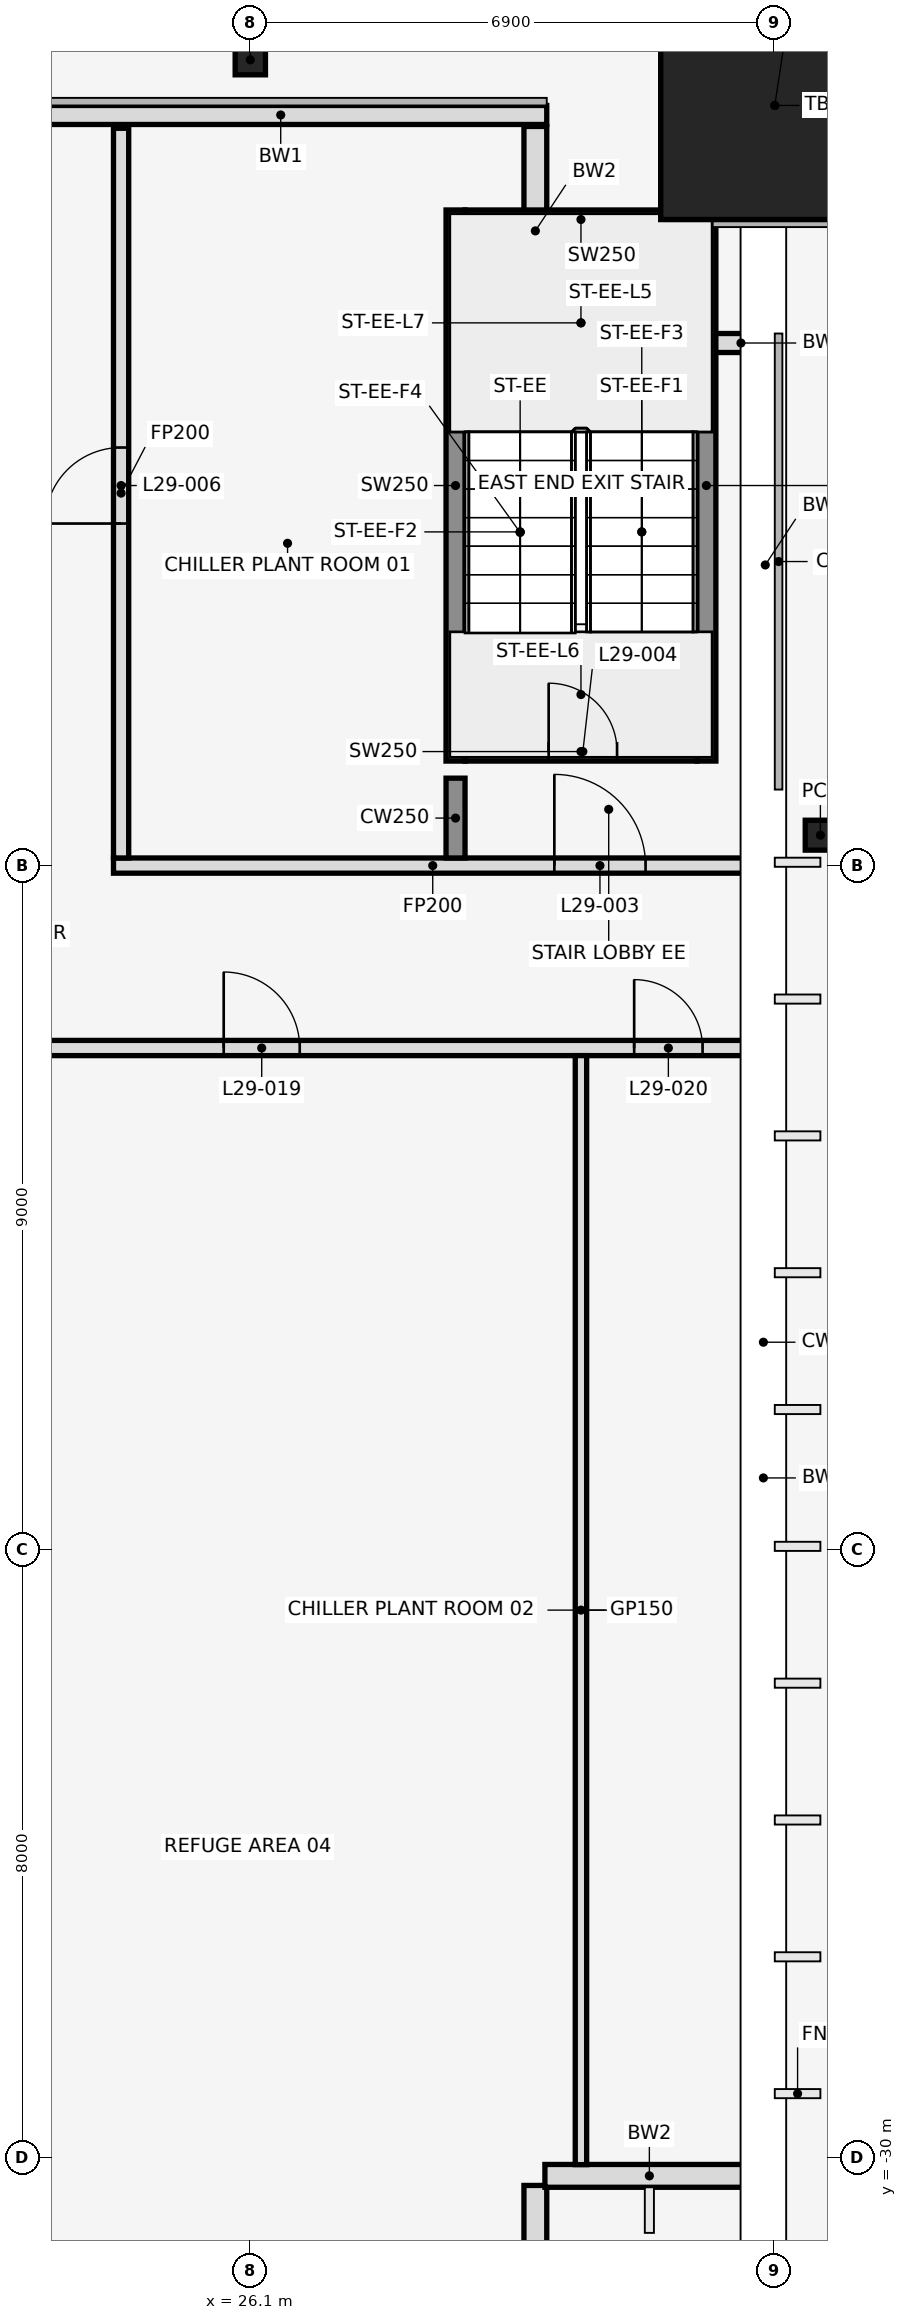
"""IFC4 building model, lengths in metres.
Left out: names, types, materials, properties, quantities, classifications, styles, units other than length and angle.
Written with IfcOpenShell. Run it as: python <this file> out.ifc"""

import sys

from ifc_helpers import new_model, si_unit, direction, frame, frame_2d, origin, origin_2d, place, context, subcontext, project, spatial, rectangle, hollow_rectangle, i_section, extrude, element, fill, save


model = new_model("IFC4")
c1 = context("Model", 3, precision=1e-05, world=origin(), true_north=direction((0.0, 1.0)))
c2 = subcontext(c1, "Body", "Model", "MODEL_VIEW")
j1 = project(units=[si_unit("LENGTHUNIT", "METRE"), si_unit("PLANEANGLEUNIT", "RADIAN")], contexts=[c1])
p1 = place(None, origin())
s1 = spatial("IfcSite", under=j1, at=p1, CompositionType="ELEMENT")
p2 = place(p1, origin())
s2 = spatial("IfcBuilding", under=s1, at=p2, CompositionType="ELEMENT")
p3 = place(p2, frame((0.0, 0.0, 135.0)))
s3 = spatial("IfcBuildingStorey", under=s2, at=p3, CompositionType="ELEMENT", Elevation=135.0)
p4 = place(p3, frame((26.1, -2.4, 0.0), z_axis=(0.0, 0.0, 1.0), x_axis=(1.0, 0.0, 0.0)))
e1 = element("IfcColumn", 1, at=p4, inside=s3, PredefinedType="COLUMN", context=c2, shape_type="SweptSolid", body=[
    extrude(i_section(OverallWidth=0.399, OverallDepth=0.394, WebThickness=0.023, FlangeThickness=0.037, at=origin_2d()), origin(), (0.0, 0.0, 1.0), 5.4),
])
p5 = place(p3, frame((33.0, -3.0, 0.0), z_axis=(0.0, 0.0, 1.0), x_axis=(1.0, 0.0, 0.0)))
e2 = element("IfcColumn", 2, at=p5, inside=s3, PredefinedType="COLUMN", context=c2, shape_type="SweptSolid", body=[
    extrude(hollow_rectangle(XDim=3.0, YDim=3.0, WallThickness=0.09, at=origin_2d()), origin(), (0.0, 0.0, 1.0), 4.98),
])
p6 = place(p3, frame((33.6, -12.6, 0.0), z_axis=(0.0, 0.0, 1.0), x_axis=(1.0, 0.0, 0.0)))
e3 = element("IfcColumn", 3, at=p6, inside=s3, PredefinedType="COLUMN", context=c2, shape_type="SweptSolid", body=[
    extrude(i_section(OverallWidth=0.399, OverallDepth=0.394, WebThickness=0.023, FlangeThickness=0.037, at=origin_2d()), origin(), (0.0, 0.0, 1.0), 5.4),
])
p7 = place(p3, frame((33.0, -3.0, 4.98), z_axis=(0.0, 0.0, 1.0), x_axis=(1.0, 0.0, 0.0)))
e4 = element("IfcColumn", 4, at=p7, inside=s3, PredefinedType="COLUMN", context=c2, shape_type="SweptSolid", body=[
    extrude(rectangle(XDim=3.0, YDim=3.0, at=origin_2d()), origin(), (0.0, 0.0, 1.0), 0.42),
])
p8 = place(p3, frame((32.85, -30.112, 0.0), z_axis=(0.0, 0.0, 1.0), x_axis=(0.0, 1.0, 0.0)))
e5 = element("IfcWall", 5, at=p8, inside=s3, PredefinedType="STANDARD", context=c2, shape_type="SweptSolid", body=[
    extrude(rectangle(XDim=18.112, YDim=0.3, at=frame_2d((9.056, 0.0))), origin(), (0.0, 0.0, 1.0), 4.338),
])
p9 = place(p3, frame((29.85, -6.024, 0.0), z_axis=(0.0, 0.0, 1.0), x_axis=(0.0, 1.0, 0.0)))
e6 = element("IfcWall", 6, at=p9, inside=s3, PredefinedType="STANDARD", context=c2, shape_type="SweptSolid", body=[
    extrude(rectangle(XDim=2.748, YDim=0.3, at=frame_2d((1.374, 0.0))), origin(), (0.0, 0.0, 1.0), 5.25),
])
p10 = place(p3, frame((29.85, -33.112, 0.0), z_axis=(0.0, 0.0, 1.0), x_axis=(0.0, 1.0, 0.0)))
e7 = element("IfcWall", 7, at=p10, inside=s3, PredefinedType="STANDARD", context=c2, shape_type="SweptSolid", body=[
    extrude(rectangle(XDim=2.748, YDim=0.3, at=frame_2d((1.374, 0.0))), origin(), (0.0, 0.0, 1.0), 4.28),
])
p11 = place(p3, frame((29.976, -30.238, 0.0), z_axis=(0.0, 0.0, 1.0), x_axis=(1.0, 0.0, 0.0)))
e8 = element("IfcWall", 8, at=p11, inside=s3, PredefinedType="STANDARD", context=c2, shape_type="SweptSolid", body=[
    extrude(rectangle(XDim=2.748, YDim=0.3, at=frame_2d((1.374, 0.0))), origin(), (0.0, 0.0, 1.0), 4.28),
])
p12 = place(p3, frame((32.875, -12.09, 0.0), z_axis=(0.0, 0.0, 1.0), x_axis=(0.0, 1.0, 0.0)))
e9 = element("IfcWall", 9, at=p12, inside=s3, PredefinedType="STANDARD", context=c2, shape_type="SweptSolid", body=[
    extrude(rectangle(XDim=6.09, YDim=0.25, at=frame_2d((3.045, 0.0))), origin(), (0.0, 0.0, 1.0), 5.25),
])
p13 = place(p3, frame((33.0, -6.125, 0.0), z_axis=(0.0, 0.0, 1.0), x_axis=(-1.0, 0.0, 0.0)))
e10 = element("IfcWall", 10, at=p13, inside=s3, PredefinedType="STANDARD", context=c2, shape_type="SweptSolid", body=[
    extrude(rectangle(XDim=0.89, YDim=0.25, at=frame_2d((0.445, 0.0))), origin(), (0.0, 0.0, 1.0), 5.25),
])
p14 = place(p3, frame((30.0, -3.125, 0.0), z_axis=(0.0, 0.0, 1.0), x_axis=(-1.0, 0.0, 0.0)))
e11 = element("IfcWall", 11, at=p14, inside=s3, PredefinedType="STANDARD", context=c2, shape_type="SweptSolid", body=[
    extrude(rectangle(XDim=7.0, YDim=0.25, at=frame_2d((3.5, 0.0))), origin(), (0.0, 0.0, 1.0), 5.25),
])
for number, where, z_axis, x_axis in (
    (12, (28.8, -11.625, 0.0), (0.0, 0.0, 1.0), (0.0, 1.0, 0.0)),
    (13, (32.1, -11.625, 0.0), (0.0, 0.0, 1.0), (0.0, 1.0, 0.0)),
):
    element("IfcWall", number, at=place(p3, frame(where, z_axis=z_axis, x_axis=x_axis)), inside=s3, PredefinedType="SHEAR", context=c2, shape_type="SweptSolid", body=[
        extrude(rectangle(XDim=7.25, YDim=0.25, at=frame_2d((3.625, 0.0))), origin(), (0.0, 0.0, 1.0), 5.4),
    ])
p15 = place(p3, frame((28.925, -11.5, 0.0), z_axis=(0.0, 0.0, 1.0), x_axis=(1.0, 0.0, 0.0)))
e14 = element("IfcWall", 14, at=p15, inside=s3, PredefinedType="SHEAR", context=c2, shape_type="SweptSolid", body=[
    extrude(rectangle(XDim=3.05, YDim=0.25, at=frame_2d((1.525, 0.0))), origin(), (0.0, 0.0, 1.0), 5.4),
])
p16 = place(p15, frame((1.1, 0.0, 0.0)))
e15 = element("IfcOpeningElement", 15, at=p16, cuts=e14, PredefinedType="OPENING", context=c2, shape_type="SweptSolid", body=[
    extrude(rectangle(XDim=0.9, YDim=2.1, at=frame_2d((0.45, 1.05))), frame((0.0, 0.137, 0.0), z_axis=(0.0, -1.0, 0.0), x_axis=(1.0, 0.0, 0.0)), (0.0, 0.0, 1.0), 0.274),
])
p17 = place(p3, frame((28.925, -4.5, 0.0), z_axis=(0.0, 0.0, 1.0), x_axis=(1.0, 0.0, 0.0)))
e16 = element("IfcWall", 16, at=p17, inside=s3, PredefinedType="SHEAR", context=c2, shape_type="SweptSolid", body=[
    extrude(rectangle(XDim=3.05, YDim=0.25, at=frame_2d((1.525, 0.0))), origin(), (0.0, 0.0, 1.0), 5.4),
])
p18 = place(p3, frame((-32.7, -15.4, 0.0), z_axis=(0.0, 0.0, 1.0), x_axis=(1.0, 0.0, 0.0)))
e17 = element("IfcWall", 17, at=p18, inside=s3, PredefinedType="PARTITIONING", context=c2, shape_type="SweptSolid", body=[
    extrude(rectangle(XDim=65.4, YDim=0.2, at=frame_2d((32.7, 0.0))), origin(), (0.0, 0.0, 1.0), 4.24),
])
p19 = place(p18, frame((0.7, 0.0, 0.0)))
e18 = element("IfcOpeningElement", 18, at=p19, cuts=e17, PredefinedType="OPENING", context=c2, shape_type="SweptSolid", body=[
    extrude(rectangle(XDim=0.9, YDim=2.1, at=frame_2d((0.45, 1.05))), frame((0.0, 0.112, 0.0), z_axis=(0.0, -1.0, 0.0), x_axis=(1.0, 0.0, 0.0)), (0.0, 0.0, 1.0), 0.224),
])
p20 = place(p18, frame((5.95, 0.0, 0.0)))
e19 = element("IfcOpeningElement", 19, at=p20, cuts=e17, PredefinedType="OPENING", context=c2, shape_type="SweptSolid", body=[
    extrude(rectangle(XDim=1.0, YDim=2.1, at=frame_2d((0.5, 1.05))), frame((0.0, 0.112, 0.0), z_axis=(0.0, -1.0, 0.0), x_axis=(1.0, 0.0, 0.0)), (0.0, 0.0, 1.0), 0.224),
])
p21 = place(p18, frame((14.85, 0.0, 0.0)))
e20 = element("IfcOpeningElement", 20, at=p21, cuts=e17, PredefinedType="OPENING", context=c2, shape_type="SweptSolid", body=[
    extrude(rectangle(XDim=1.0, YDim=2.1, at=frame_2d((0.5, 1.05))), frame((0.0, 0.112, 0.0), z_axis=(0.0, -1.0, 0.0), x_axis=(1.0, 0.0, 0.0)), (0.0, 0.0, 1.0), 0.224),
])
p22 = place(p18, frame((23.55, 0.0, 0.0)))
e21 = element("IfcOpeningElement", 21, at=p22, cuts=e17, PredefinedType="OPENING", context=c2, shape_type="SweptSolid", body=[
    extrude(rectangle(XDim=1.0, YDim=2.1, at=frame_2d((0.5, 1.05))), frame((0.0, 0.112, 0.0), z_axis=(0.0, -1.0, 0.0), x_axis=(1.0, 0.0, 0.0)), (0.0, 0.0, 1.0), 0.224),
])
p23 = place(p18, frame((34.4, 0.0, 0.0)))
e22 = element("IfcOpeningElement", 22, at=p23, cuts=e17, PredefinedType="OPENING", context=c2, shape_type="SweptSolid", body=[
    extrude(rectangle(XDim=1.0, YDim=2.1, at=frame_2d((0.5, 1.05))), frame((0.0, 0.112, 0.0), z_axis=(0.0, -1.0, 0.0), x_axis=(1.0, 0.0, 0.0)), (0.0, 0.0, 1.0), 0.224),
])
p24 = place(p18, frame((40.95, 0.0, 0.0)))
e23 = element("IfcOpeningElement", 23, at=p24, cuts=e17, PredefinedType="OPENING", context=c2, shape_type="SweptSolid", body=[
    extrude(rectangle(XDim=1.0, YDim=2.1, at=frame_2d((0.5, 1.05))), frame((0.0, 0.112, 0.0), z_axis=(0.0, -1.0, 0.0), x_axis=(1.0, 0.0, 0.0)), (0.0, 0.0, 1.0), 0.224),
])
p25 = place(p18, frame((49.65, 0.0, 0.0)))
e24 = element("IfcOpeningElement", 24, at=p25, cuts=e17, PredefinedType="OPENING", context=c2, shape_type="SweptSolid", body=[
    extrude(rectangle(XDim=0.9, YDim=2.1, at=frame_2d((0.45, 1.05))), frame((0.0, 0.112, 0.0), z_axis=(0.0, -1.0, 0.0), x_axis=(1.0, 0.0, 0.0)), (0.0, 0.0, 1.0), 0.224),
])
p26 = place(p18, frame((58.45, 0.0, 0.0)))
e25 = element("IfcOpeningElement", 25, at=p26, cuts=e17, PredefinedType="OPENING", context=c2, shape_type="SweptSolid", body=[
    extrude(rectangle(XDim=1.0, YDim=2.1, at=frame_2d((0.5, 1.05))), frame((0.0, 0.112, 0.0), z_axis=(0.0, -1.0, 0.0), x_axis=(1.0, 0.0, 0.0)), (0.0, 0.0, 1.0), 0.224),
])
p27 = place(p18, frame((63.85, 0.0, 0.0)))
e26 = element("IfcOpeningElement", 26, at=p27, cuts=e17, PredefinedType="OPENING", context=c2, shape_type="SweptSolid", body=[
    extrude(rectangle(XDim=0.9, YDim=2.1, at=frame_2d((0.45, 1.05))), frame((0.0, 0.112, 0.0), z_axis=(0.0, -1.0, 0.0), x_axis=(1.0, 0.0, 0.0)), (0.0, 0.0, 1.0), 0.224),
])
p28 = place(p3, frame((24.3, -13.0, 0.0), z_axis=(0.0, 0.0, 1.0), x_axis=(1.0, 0.0, 0.0)))
e27 = element("IfcWall", 27, at=p28, inside=s3, PredefinedType="PARTITIONING", context=c2, shape_type="SweptSolid", body=[
    extrude(rectangle(XDim=8.4, YDim=0.2, at=frame_2d((4.2, 0.0))), origin(), (0.0, 0.0, 1.0), 4.24),
])
p29 = place(p28, frame((5.8, 0.0, 0.0)))
e28 = element("IfcOpeningElement", 28, at=p29, cuts=e27, PredefinedType="OPENING", context=c2, shape_type="SweptSolid", body=[
    extrude(rectangle(XDim=1.2, YDim=2.1, at=frame_2d((0.6, 1.05))), frame((0.0, 0.112, 0.0), z_axis=(0.0, -1.0, 0.0), x_axis=(1.0, 0.0, 0.0)), (0.0, 0.0, 1.0), 0.224),
])
p30 = place(p3, frame((24.4, -12.9, 0.0), z_axis=(0.0, 0.0, 1.0), x_axis=(0.0, 1.0, 0.0)))
e29 = element("IfcWall", 29, at=p30, inside=s3, PredefinedType="PARTITIONING", context=c2, shape_type="SweptSolid", body=[
    extrude(rectangle(XDim=9.6, YDim=0.2, at=frame_2d((4.8, 0.0))), origin(), (0.0, 0.0, 1.0), 4.24),
])
p31 = place(p30, frame((4.4, 0.0, 0.0)))
e30 = element("IfcOpeningElement", 30, at=p31, cuts=e29, PredefinedType="OPENING", context=c2, shape_type="SweptSolid", body=[
    extrude(rectangle(XDim=1.0, YDim=2.1, at=frame_2d((0.5, 1.05))), frame((0.0, 0.112, 0.0), z_axis=(0.0, -1.0, 0.0), x_axis=(1.0, 0.0, 0.0)), (0.0, 0.0, 1.0), 0.224),
])
p32 = place(p3, frame((28.8, -12.9, 0.0), z_axis=(0.0, 0.0, 1.0), x_axis=(0.0, 1.0, 0.0)))
e31 = element("IfcWall", 31, at=p32, inside=s3, PredefinedType="SHEAR", context=c2, shape_type="SweptSolid", body=[
    extrude(rectangle(XDim=1.05, YDim=0.25, at=frame_2d((0.525, 0.0))), origin(), (0.0, 0.0, 1.0), 5.4),
])
p33 = place(p3, frame((30.45, -30.09, 0.0), z_axis=(0.0, 0.0, 1.0), x_axis=(0.0, 1.0, 0.0)))
e32 = element("IfcWall", 32, at=p33, inside=s3, PredefinedType="PARTITIONING", context=c2, shape_type="SweptSolid", body=[
    extrude(rectangle(XDim=14.59, YDim=0.15, at=frame_2d((7.295, 0.0))), origin(), (0.0, 0.0, 1.0), 4.24),
])
p34 = place(p29, origin())
e33 = element("IfcDoor", 33, at=p34, inside=s3, OperationType="SINGLE_SWING_RIGHT", PredefinedType="DOOR", context=c2, shape_type="SweptSolid", body=[
    extrude(rectangle(XDim=1.2, YDim=2.1, at=frame_2d((0.6, 1.05))), frame((0.0, 0.025, 0.0), z_axis=(0.0, -1.0, 0.0), x_axis=(1.0, 0.0, 0.0)), (0.0, 0.0, 1.0), 0.05),
])
fill(e28, e33)
p35 = place(p16, origin())
e34 = element("IfcDoor", 34, at=p35, inside=s3, OperationType="SINGLE_SWING_LEFT", PredefinedType="DOOR", context=c2, shape_type="SweptSolid", body=[
    extrude(rectangle(XDim=0.9, YDim=2.1, at=frame_2d((0.45, 1.05))), frame((0.0, 0.025, 0.0), z_axis=(0.0, -1.0, 0.0), x_axis=(1.0, 0.0, 0.0)), (0.0, 0.0, 1.0), 0.05),
])
fill(e15, e34)
p36 = place(p31, frame((1.0, 0.0, 0.0), z_axis=(0.0, 0.0, 1.0), x_axis=(-1.0, 0.0, 0.0)))
e35 = element("IfcDoor", 35, at=p36, inside=s3, OperationType="SINGLE_SWING_RIGHT", PredefinedType="DOOR", context=c2, shape_type="SweptSolid", body=[
    extrude(rectangle(XDim=1.0, YDim=2.1, at=frame_2d((0.5, 1.05))), frame((0.0, 0.025, 0.0), z_axis=(0.0, -1.0, 0.0), x_axis=(1.0, 0.0, 0.0)), (0.0, 0.0, 1.0), 0.05),
])
fill(e30, e35)
p37 = place(p26, frame((1.0, 0.0, 0.0), z_axis=(0.0, 0.0, 1.0), x_axis=(-1.0, 0.0, 0.0)))
e36 = element("IfcDoor", 36, at=p37, inside=s3, OperationType="SINGLE_SWING_LEFT", PredefinedType="DOOR", context=c2, shape_type="SweptSolid", body=[
    extrude(rectangle(XDim=1.0, YDim=2.1, at=frame_2d((0.5, 1.05))), frame((0.0, 0.025, 0.0), z_axis=(0.0, -1.0, 0.0), x_axis=(1.0, 0.0, 0.0)), (0.0, 0.0, 1.0), 0.05),
])
fill(e25, e36)
p38 = place(p27, frame((0.9, 0.0, 0.0), z_axis=(0.0, 0.0, 1.0), x_axis=(-1.0, 0.0, 0.0)))
e37 = element("IfcDoor", 37, at=p38, inside=s3, OperationType="SINGLE_SWING_RIGHT", PredefinedType="DOOR", context=c2, shape_type="SweptSolid", body=[
    extrude(rectangle(XDim=0.9, YDim=2.1, at=frame_2d((0.45, 1.05))), frame((0.0, 0.025, 0.0), z_axis=(0.0, -1.0, 0.0), x_axis=(1.0, 0.0, 0.0)), (0.0, 0.0, 1.0), 0.05),
])
fill(e26, e37)
save(model, sys.argv[1])
